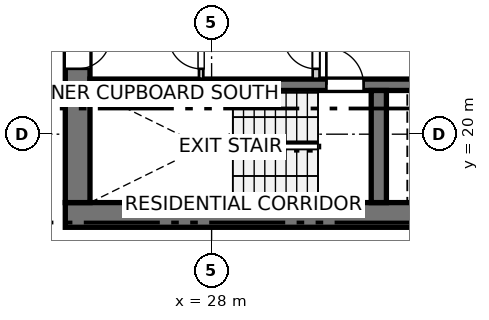
"""IFC4 building model, lengths in metres.
Left out: names, types, materials, properties, quantities, classifications, styles, units other than length and angle.
Written with IfcOpenShell. Run it as: python <this file> out.ifc"""

import sys

from ifc_helpers import new_model, si_unit, direction, frame, frame_2d, origin, place, context, subcontext, project, spatial, rectangle, extrude, source, transform, mapped, element, fill, save


model = new_model("IFC4")
c1 = context("Model", 3, precision=1e-05, world=origin(), true_north=direction((0.0, 1.0)))
c2 = subcontext(c1, "Body", "Model", "MODEL_VIEW")
j1 = project(units=[si_unit("LENGTHUNIT", "METRE"), si_unit("PLANEANGLEUNIT", "RADIAN")], contexts=[c1])
p1 = place(None, origin())
s1 = spatial("IfcSite", under=j1, at=p1, CompositionType="ELEMENT")
p2 = place(p1, origin())
s2 = spatial("IfcBuilding", under=s1, at=p2, CompositionType="ELEMENT")
p3 = place(p2, frame((0.0, 0.0, 112.0)))
s3 = spatial("IfcBuildingStorey", under=s2, at=p3, CompositionType="ELEMENT", Elevation=112.0)
p4 = place(p3, frame((24.15, 17.875, 0.0), z_axis=(0.0, 0.0, 1.0), x_axis=(1.0, 0.0, 0.0)))
e1 = element("IfcWall", 1, at=p4, inside=s3, PredefinedType="SHEAR", context=c2, shape_type="SweptSolid", body=[
    extrude(rectangle(XDim=12.4, YDim=0.65, at=frame_2d((6.2, 0.0))), origin(), (0.0, 0.0, 1.0), 2.935),
])
p5 = place(p3, frame((24.475, 33.8, 0.0), z_axis=(0.0, 0.0, 1.0), x_axis=(0.0, -1.0, 0.0)))
e2 = element("IfcWall", 2, at=p5, inside=s3, PredefinedType="SHEAR", context=c2, shape_type="SweptSolid", body=[
    extrude(rectangle(XDim=15.6, YDim=0.65, at=frame_2d((7.8, 0.0))), origin(), (0.0, 0.0, 1.0), 2.935),
])
p6 = place(p5, frame((7.05, 0.0, 0.0)))
e3 = element("IfcOpeningElement", 3, at=p6, cuts=e2, PredefinedType="OPENING", context=c2, shape_type="SweptSolid", body=[
    extrude(rectangle(XDim=1.5, YDim=2.15, at=frame_2d((0.75, 1.075))), frame((0.0, 0.335, 0.0), z_axis=(0.0, -1.0, 0.0), x_axis=(1.0, 0.0, 0.0)), (0.0, 0.0, 1.0), 0.67),
])
p7 = place(p5, frame((3.52, 0.0, 0.0)))
e4 = element("IfcOpeningElement", 4, at=p7, cuts=e2, PredefinedType="OPENING", context=c2, shape_type="SweptSolid", body=[
    extrude(rectangle(XDim=0.86, YDim=2.05, at=frame_2d((0.43, 1.025))), frame((0.0, 0.335, 0.0), z_axis=(0.0, -1.0, 0.0), x_axis=(1.0, 0.0, 0.0)), (0.0, 0.0, 1.0), 0.67),
])
p8 = place(p5, frame((11.22, 0.0, 0.0)))
e5 = element("IfcOpeningElement", 5, at=p8, cuts=e2, PredefinedType="OPENING", context=c2, shape_type="SweptSolid", body=[
    extrude(rectangle(XDim=0.86, YDim=2.05, at=frame_2d((0.43, 1.025))), frame((0.0, 0.335, 0.0), z_axis=(0.0, -1.0, 0.0), x_axis=(1.0, 0.0, 0.0)), (0.0, 0.0, 1.0), 0.67),
])
p9 = place(p3, frame((24.8, 21.3, 0.0), z_axis=(0.0, 0.0, 1.0), x_axis=(1.0, 0.0, 0.0)))
e6 = element("IfcWall", 6, at=p9, inside=s3, PredefinedType="SHEAR", context=c2, shape_type="SweptSolid", body=[
    extrude(rectangle(XDim=11.1, YDim=0.3, at=frame_2d((5.55, 0.0))), origin(), (0.0, 0.0, 1.0), 2.935),
])
p10 = place(p9, frame((6.22, 0.0, 0.0)))
e7 = element("IfcOpeningElement", 7, at=p10, cuts=e6, PredefinedType="OPENING", context=c2, shape_type="SweptSolid", body=[
    extrude(rectangle(XDim=0.98, YDim=2.15, at=frame_2d((0.49, 1.075))), frame((0.0, 0.16, 0.0), z_axis=(0.0, -1.0, 0.0), x_axis=(1.0, 0.0, 0.0)), (0.0, 0.0, 1.0), 0.32),
])
p11 = place(p9, frame((9.15, 0.0, 0.0)))
e8 = element("IfcOpeningElement", 8, at=p11, cuts=e6, PredefinedType="OPENING", context=c2, shape_type="SweptSolid", body=[
    extrude(rectangle(XDim=1.15, YDim=2.15, at=frame_2d((0.575, 1.075))), frame((0.0, 0.16, 0.0), z_axis=(0.0, -1.0, 0.0), x_axis=(1.0, 0.0, 0.0)), (0.0, 0.0, 1.0), 0.32),
])
p12 = place(p3, frame((32.4, 18.2, 0.0), z_axis=(0.0, 0.0, 1.0), x_axis=(0.0, 1.0, 0.0)))
e9 = element("IfcWall", 9, at=p12, inside=s3, PredefinedType="SHEAR", context=c2, shape_type="SweptSolid", body=[
    extrude(rectangle(XDim=2.95, YDim=0.4, at=frame_2d((1.475, 0.0))), origin(), (0.0, 0.0, 1.0), 2.935),
])
p13 = place(p3, frame((30.75, 21.46, 0.0), z_axis=(0.0, 0.0, 1.0), x_axis=(0.0, 1.0, 0.0)))
e10 = element("IfcWall", 10, at=p13, inside=s3, PredefinedType="PARTITIONING", context=c2, shape_type="SweptSolid", body=[
    extrude(rectangle(XDim=3.11, YDim=0.18, at=frame_2d((1.555, 0.0))), origin(), (0.0, 0.0, 1.0), 2.935),
])
p14 = place(p13, frame((0.26, 0.0, 0.0)))
e11 = element("IfcOpeningElement", 11, at=p14, cuts=e10, PredefinedType="OPENING", context=c2, shape_type="SweptSolid", body=[
    extrude(rectangle(XDim=0.86, YDim=2.05, at=frame_2d((0.43, 1.025))), frame((0.0, 0.1, 0.0), z_axis=(0.0, -1.0, 0.0), x_axis=(1.0, 0.0, 0.0)), (0.0, 0.0, 1.0), 0.2),
])
p15 = place(p3, frame((27.725, 21.46, 0.0), z_axis=(0.0, 0.0, 1.0), x_axis=(0.0, 1.0, 0.0)))
e12 = element("IfcWall", 12, at=p15, inside=s3, PredefinedType="PARTITIONING", context=c2, shape_type="SweptSolid", body=[
    extrude(rectangle(XDim=1.38, YDim=0.115, at=frame_2d((0.69, 0.0))), origin(), (0.0, 0.0, 1.0), 2.935),
])
p16 = place(p15, frame((0.26, 0.0, 0.0)))
e13 = element("IfcOpeningElement", 13, at=p16, cuts=e12, PredefinedType="OPENING", context=c2, shape_type="SweptSolid", body=[
    extrude(rectangle(XDim=0.86, YDim=2.05, at=frame_2d((0.43, 1.025))), frame((0.0, 0.067, 0.0), z_axis=(0.0, -1.0, 0.0), x_axis=(1.0, 0.0, 0.0)), (0.0, 0.0, 1.0), 0.135),
])
m1 = source(origin(), c2, "Body", "SweptSolid", [
    extrude(rectangle(XDim=0.98, YDim=2.15, at=frame_2d((0.49, 1.075))), frame((0.0, 0.025, 0.0), z_axis=(0.0, -1.0, 0.0), x_axis=(1.0, 0.0, 0.0)), (0.0, 0.0, 1.0), 0.05),
])
p17 = place(p10, origin())
e14 = element("IfcDoor", 14, at=p17, inside=s3, OperationType="SINGLE_SWING_LEFT", PredefinedType="DOOR", context=c2, shape_type="MappedRepresentation", body=[
    mapped(m1, transform((0.0, 0.0, 0.0), x_axis=(1.0, 0.0, 0.0), y_axis=(0.0, 1.0, 0.0), z_axis=(0.0, 0.0, 1.0), scale=1.0)),
])
fill(e7, e14)
m2 = source(origin(), c2, "Body", "SweptSolid", [
    extrude(rectangle(XDim=0.86, YDim=2.05, at=frame_2d((0.43, 1.025))), frame((0.0, 0.025, 0.0), z_axis=(0.0, -1.0, 0.0), x_axis=(1.0, 0.0, 0.0)), (0.0, 0.0, 1.0), 0.05),
])
p18 = place(p8, origin())
e15 = element("IfcDoor", 15, at=p18, inside=s3, OperationType="SINGLE_SWING_LEFT", PredefinedType="DOOR", context=c2, shape_type="MappedRepresentation", body=[
    mapped(m2, transform((0.0, 0.0, 0.0), x_axis=(1.0, 0.0, 0.0), y_axis=(0.0, 1.0, 0.0), z_axis=(0.0, 0.0, 1.0), scale=1.0)),
])
fill(e5, e15)
p19 = place(p14, origin())
e16 = element("IfcDoor", 16, at=p19, inside=s3, OperationType="SINGLE_SWING_RIGHT", PredefinedType="DOOR", context=c2, shape_type="MappedRepresentation", body=[
    mapped(m2, transform((0.0, 0.0, 0.0), x_axis=(1.0, 0.0, 0.0), y_axis=(0.0, 1.0, 0.0), z_axis=(0.0, 0.0, 1.0), scale=1.0)),
])
fill(e11, e16)
p20 = place(p16, origin())
e17 = element("IfcDoor", 17, at=p20, inside=s3, OperationType="SINGLE_SWING_RIGHT", PredefinedType="DOOR", context=c2, shape_type="MappedRepresentation", body=[
    mapped(m2, transform((0.0, 0.0, 0.0), x_axis=(1.0, 0.0, 0.0), y_axis=(0.0, 1.0, 0.0), z_axis=(0.0, 0.0, 1.0), scale=1.0)),
])
fill(e13, e17)
save(model, sys.argv[1])
